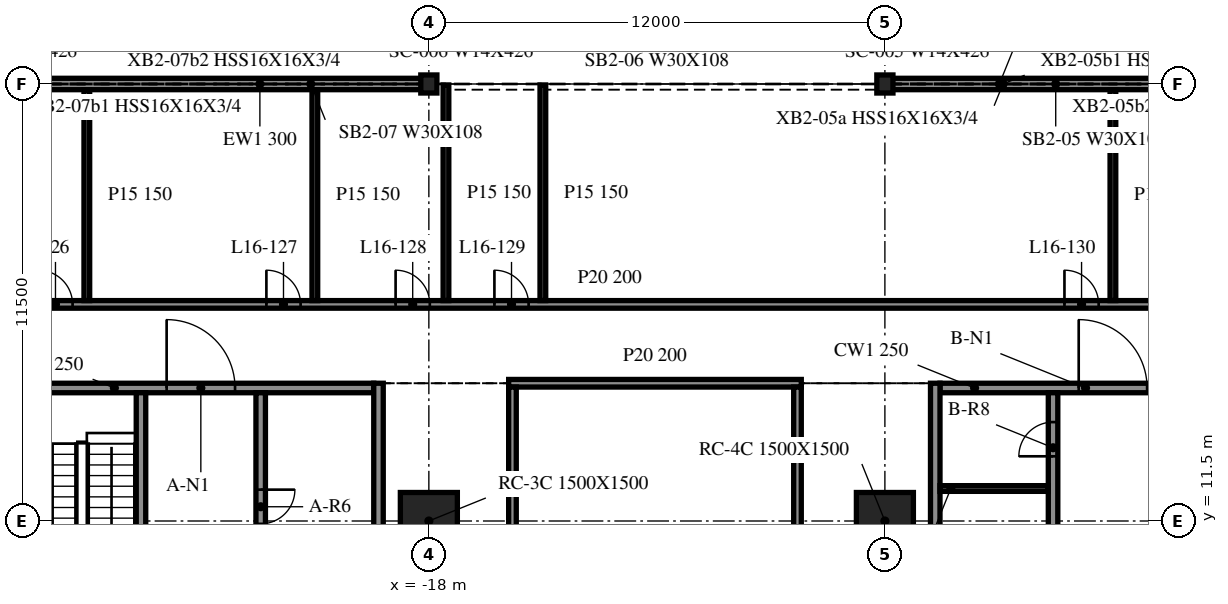
"""IFC4 building model, lengths in metres.
Left out: names, types, materials, properties, quantities, classifications, styles, units other than length and angle.
Written with IfcOpenShell. Run it as: python <this file> out.ifc"""

import sys

from ifc_helpers import new_model, si_unit, direction, frame, frame_2d, origin, origin_2d, place, context, subcontext, project, spatial, rectangle, i_section, extrude, element, fill, save


model = new_model("IFC4")
c1 = context("Model", 3, precision=1e-05, world=origin(), true_north=direction((0.0, 1.0)))
c2 = subcontext(c1, "Body", "Model", "MODEL_VIEW")
j1 = project(units=[si_unit("LENGTHUNIT", "METRE"), si_unit("PLANEANGLEUNIT", "RADIAN")], contexts=[c1])
p1 = place(None, origin())
s1 = spatial("IfcSite", under=j1, at=p1, CompositionType="ELEMENT")
p2 = place(p1, origin())
s2 = spatial("IfcBuilding", under=s1, at=p2, CompositionType="ELEMENT")
p3 = place(p2, frame((0.0, 0.0, 71.8)))
s3 = spatial("IfcBuildingStorey", under=s2, at=p3, CompositionType="ELEMENT", Elevation=71.8)
for number, where, z_axis, x_axis in (
    (1, (-18.0, 11.5, -0.34), (0.0, 0.0, 1.0), (1.0, 0.0, 0.0)),
    (2, (-6.0, 11.5, -0.34), (0.0, 0.0, 1.0), (1.0, 0.0, 0.0)),
):
    element("IfcColumn", number, at=place(p3, frame(where, z_axis=z_axis, x_axis=x_axis)), inside=s3, PredefinedType="COLUMN", context=c2, shape_type="SweptSolid", body=[
        extrude(rectangle(XDim=1.5, YDim=1.5, at=origin_2d()), origin(), (0.0, 0.0, 1.0), 4.3),
    ])
for number, where, z_axis, x_axis in (
    (3, (-6.0, 23.0, -0.34), (0.0, 0.0, 1.0), (1.0, 0.0, 0.0)),
    (4, (-18.0, 23.0, -0.34), (0.0, 0.0, 1.0), (1.0, 0.0, 0.0)),
):
    element("IfcColumn", number, at=place(p3, frame(where, z_axis=z_axis, x_axis=x_axis)), inside=s3, PredefinedType="COLUMN", context=c2, shape_type="SweptSolid", body=[
        extrude(i_section(OverallWidth=0.424, OverallDepth=0.475, WebThickness=0.048, FlangeThickness=0.077, at=origin_2d()), origin(), (0.0, 0.0, 1.0), 4.3),
    ])
for number, where, z_axis, x_axis in (
    (5, (5.976, 23.0, 0.0), (0.0, 0.0, 1.0), (-1.0, 0.0, 0.0)),
    (6, (-18.024, 23.0, 0.0), (0.0, 0.0, 1.0), (-1.0, 0.0, 0.0)),
):
    element("IfcWall", number, at=place(p3, frame(where, z_axis=z_axis, x_axis=x_axis)), inside=s3, PredefinedType="NOTDEFINED", context=c2, shape_type="SweptSolid", body=[
        extrude(rectangle(XDim=11.952, YDim=0.3, at=frame_2d((5.976, 0.0))), origin(), (0.0, 0.0, 1.0), 3.203),
    ])
p4 = place(p3, frame((-19.325, -9.125, 0.0), z_axis=(0.0, 0.0, 1.0), x_axis=(0.0, 1.0, 0.0)))
e7 = element("IfcWall", 7, at=p4, inside=s3, PredefinedType="SOLIDWALL", context=c2, shape_type="SweptSolid", body=[
    extrude(rectangle(XDim=24.25, YDim=0.25, at=frame_2d((12.125, 0.0))), origin(), (0.0, 0.0, 1.0), 3.96),
])
p5 = place(p3, frame((-28.55, 15.0, 0.0), z_axis=(0.0, 0.0, 1.0), x_axis=(1.0, 0.0, 0.0)))
e8 = element("IfcWall", 8, at=p5, inside=s3, PredefinedType="SOLIDWALL", context=c2, shape_type="SweptSolid", body=[
    extrude(rectangle(XDim=9.1, YDim=0.25, at=frame_2d((4.55, 0.0))), origin(), (0.0, 0.0, 1.0), 3.96),
])
p6 = place(p5, frame((3.65, 0.0, 0.0)))
e9 = element("IfcOpeningElement", 9, at=p6, cuts=e8, PredefinedType="OPENING", context=c2, shape_type="SweptSolid", body=[
    extrude(rectangle(XDim=1.8, YDim=2.1, at=frame_2d((0.9, 1.05))), frame((0.0, 0.135, 0.0), z_axis=(0.0, -1.0, 0.0), x_axis=(1.0, 0.0, 0.0)), (0.0, 0.0, 1.0), 0.27),
])
p7 = place(p3, frame((-25.575, 14.875, 0.0), z_axis=(0.0, 0.0, 1.0), x_axis=(0.0, -1.0, 0.0)))
e10 = element("IfcWall", 10, at=p7, inside=s3, PredefinedType="SOLIDWALL", context=c2, shape_type="SweptSolid", body=[
    extrude(rectangle(XDim=6.25, YDim=0.25, at=frame_2d((3.125, 0.0))), origin(), (0.0, 0.0, 1.0), 3.96),
])
p8 = place(p7, frame((4.85, 0.0, 0.0)))
e11 = element("IfcOpeningElement", 11, at=p8, cuts=e10, PredefinedType="OPENING", context=c2, shape_type="SweptSolid", body=[
    extrude(rectangle(XDim=1.0, YDim=2.1, at=frame_2d((0.5, 1.05))), frame((0.0, 0.135, 0.0), z_axis=(0.0, -1.0, 0.0), x_axis=(1.0, 0.0, 0.0)), (0.0, 0.0, 1.0), 0.27),
])
p9 = place(p3, frame((-22.425, 14.875, 0.0), z_axis=(0.0, 0.0, 1.0), x_axis=(0.0, -1.0, 0.0)))
e12 = element("IfcWall", 12, at=p9, inside=s3, PredefinedType="SOLIDWALL", context=c2, shape_type="SweptSolid", body=[
    extrude(rectangle(XDim=23.75, YDim=0.25, at=frame_2d((11.875, 0.0))), origin(), (0.0, 0.0, 1.0), 3.96),
])
p10 = place(p9, frame((15.45, 0.0, 0.0)))
e13 = element("IfcOpeningElement", 13, at=p10, cuts=e12, PredefinedType="OPENING", context=c2, shape_type="SweptSolid", body=[
    extrude(rectangle(XDim=1.1, YDim=2.1, at=frame_2d((0.55, 1.05))), frame((0.0, 0.135, 0.0), z_axis=(0.0, -1.0, 0.0), x_axis=(1.0, 0.0, 0.0)), (0.0, 0.0, 1.0), 0.27),
])
p11 = place(p9, frame((12.7, 0.0, 0.0)))
e14 = element("IfcOpeningElement", 14, at=p11, cuts=e12, PredefinedType="OPENING", context=c2, shape_type="SweptSolid", body=[
    extrude(rectangle(XDim=1.1, YDim=2.1, at=frame_2d((0.55, 1.05))), frame((0.0, 0.135, 0.0), z_axis=(0.0, -1.0, 0.0), x_axis=(1.0, 0.0, 0.0)), (0.0, 0.0, 1.0), 0.27),
])
p12 = place(p9, frame((22.137, 0.0, 0.0)))
e15 = element("IfcOpeningElement", 15, at=p12, cuts=e12, PredefinedType="OPENING", context=c2, shape_type="SweptSolid", body=[
    extrude(rectangle(XDim=0.9, YDim=2.1, at=frame_2d((0.45, 1.05))), frame((0.0, 0.135, 0.0), z_axis=(0.0, -1.0, 0.0), x_axis=(1.0, 0.0, 0.0)), (0.0, 0.0, 1.0), 0.27),
])
p13 = place(p9, frame((19.062, 0.0, 0.0)))
e16 = element("IfcOpeningElement", 16, at=p13, cuts=e12, PredefinedType="OPENING", context=c2, shape_type="SweptSolid", body=[
    extrude(rectangle(XDim=0.9, YDim=2.1, at=frame_2d((0.45, 1.05))), frame((0.0, 0.135, 0.0), z_axis=(0.0, -1.0, 0.0), x_axis=(1.0, 0.0, 0.0)), (0.0, 0.0, 1.0), 0.27),
])
p14 = place(p9, frame((2.55, 0.0, 0.0)))
e17 = element("IfcOpeningElement", 17, at=p14, cuts=e12, PredefinedType="OPENING", context=c2, shape_type="SweptSolid", body=[
    extrude(rectangle(XDim=0.9, YDim=2.1, at=frame_2d((0.45, 1.05))), frame((0.0, 0.135, 0.0), z_axis=(0.0, -1.0, 0.0), x_axis=(1.0, 0.0, 0.0)), (0.0, 0.0, 1.0), 0.27),
])
p15 = place(p3, frame((-4.675, 15.125, 0.0), z_axis=(0.0, 0.0, 1.0), x_axis=(0.0, -1.0, 0.0)))
e18 = element("IfcWall", 18, at=p15, inside=s3, PredefinedType="SOLIDWALL", context=c2, shape_type="SweptSolid", body=[
    extrude(rectangle(XDim=24.25, YDim=0.25, at=frame_2d((12.125, 0.0))), origin(), (0.0, 0.0, 1.0), 3.96),
])
p16 = place(p3, frame((-4.55, 15.0, 0.0), z_axis=(0.0, 0.0, 1.0), x_axis=(1.0, 0.0, 0.0)))
e19 = element("IfcWall", 19, at=p16, inside=s3, PredefinedType="SOLIDWALL", context=c2, shape_type="SweptSolid", body=[
    extrude(rectangle(XDim=9.1, YDim=0.25, at=frame_2d((4.55, 0.0))), origin(), (0.0, 0.0, 1.0), 3.96),
])
p17 = place(p16, frame((3.65, 0.0, 0.0)))
e20 = element("IfcOpeningElement", 20, at=p17, cuts=e19, PredefinedType="OPENING", context=c2, shape_type="SweptSolid", body=[
    extrude(rectangle(XDim=1.8, YDim=2.1, at=frame_2d((0.9, 1.05))), frame((0.0, 0.135, 0.0), z_axis=(0.0, -1.0, 0.0), x_axis=(1.0, 0.0, 0.0)), (0.0, 0.0, 1.0), 0.27),
])
p18 = place(p3, frame((-1.575, -8.875, 0.0), z_axis=(0.0, 0.0, 1.0), x_axis=(0.0, 1.0, 0.0)))
e21 = element("IfcWall", 21, at=p18, inside=s3, PredefinedType="SOLIDWALL", context=c2, shape_type="SweptSolid", body=[
    extrude(rectangle(XDim=23.75, YDim=0.25, at=frame_2d((11.875, 0.0))), origin(), (0.0, 0.0, 1.0), 3.96),
])
p19 = place(p18, frame((7.625, 0.0, 0.0)))
e22 = element("IfcOpeningElement", 22, at=p19, cuts=e21, PredefinedType="OPENING", context=c2, shape_type="SweptSolid", body=[
    extrude(rectangle(XDim=0.9, YDim=2.1, at=frame_2d((0.45, 1.05))), frame((0.0, 0.135, 0.0), z_axis=(0.0, -1.0, 0.0), x_axis=(1.0, 0.0, 0.0)), (0.0, 0.0, 1.0), 0.27),
])
p20 = place(p18, frame((11.425, 0.0, 0.0)))
e23 = element("IfcOpeningElement", 23, at=p20, cuts=e21, PredefinedType="OPENING", context=c2, shape_type="SweptSolid", body=[
    extrude(rectangle(XDim=0.9, YDim=2.1, at=frame_2d((0.45, 1.05))), frame((0.0, 0.135, 0.0), z_axis=(0.0, -1.0, 0.0), x_axis=(1.0, 0.0, 0.0)), (0.0, 0.0, 1.0), 0.27),
])
p21 = place(p18, frame((15.225, 0.0, 0.0)))
e24 = element("IfcOpeningElement", 24, at=p21, cuts=e21, PredefinedType="OPENING", context=c2, shape_type="SweptSolid", body=[
    extrude(rectangle(XDim=0.9, YDim=2.1, at=frame_2d((0.45, 1.05))), frame((0.0, 0.135, 0.0), z_axis=(0.0, -1.0, 0.0), x_axis=(1.0, 0.0, 0.0)), (0.0, 0.0, 1.0), 0.27),
])
p22 = place(p18, frame((2.55, 0.0, 0.0)))
e25 = element("IfcOpeningElement", 25, at=p22, cuts=e21, PredefinedType="OPENING", context=c2, shape_type="SweptSolid", body=[
    extrude(rectangle(XDim=0.9, YDim=2.1, at=frame_2d((0.45, 1.05))), frame((0.0, 0.135, 0.0), z_axis=(0.0, -1.0, 0.0), x_axis=(1.0, 0.0, 0.0)), (0.0, 0.0, 1.0), 0.27),
])
p23 = place(p18, frame((19.002, 0.0, 0.0)))
e26 = element("IfcOpeningElement", 26, at=p23, cuts=e21, PredefinedType="OPENING", context=c2, shape_type="SweptSolid", body=[
    extrude(rectangle(XDim=0.9, YDim=2.1, at=frame_2d((0.45, 1.05))), frame((0.0, 0.135, 0.0), z_axis=(0.0, -1.0, 0.0), x_axis=(1.0, 0.0, 0.0)), (0.0, 0.0, 1.0), 0.27),
])
p24 = place(p18, frame((22.077, 0.0, 0.0)))
e27 = element("IfcOpeningElement", 27, at=p24, cuts=e21, PredefinedType="OPENING", context=c2, shape_type="SweptSolid", body=[
    extrude(rectangle(XDim=0.9, YDim=2.1, at=frame_2d((0.45, 1.05))), frame((0.0, 0.135, 0.0), z_axis=(0.0, -1.0, 0.0), x_axis=(1.0, 0.0, 0.0)), (0.0, 0.0, 1.0), 0.27),
])
p25 = place(p3, frame((-4.55, 12.355, 0.0), z_axis=(0.0, 0.0, 1.0), x_axis=(1.0, 0.0, 0.0)))
e28 = element("IfcWall", 28, at=p25, inside=s3, PredefinedType="PARTITIONING", context=c2, shape_type="SweptSolid", body=[
    extrude(rectangle(XDim=2.85, YDim=0.15, at=frame_2d((1.425, 0.0))), origin(), (0.0, 0.0, 1.0), 3.96),
])
p26 = place(p3, frame((-15.9, 15.125, 0.0), z_axis=(0.0, 0.0, 1.0), x_axis=(1.0, 0.0, 0.0)))
e29 = element("IfcWall", 29, at=p26, inside=s3, PredefinedType="PARTITIONING", context=c2, shape_type="SweptSolid", body=[
    extrude(rectangle(XDim=7.7, YDim=0.2, at=frame_2d((3.85, 0.0))), origin(), (0.0, 0.0, 1.0), 3.96),
])
p27 = place(p3, frame((-41.975, 17.2, 0.0), z_axis=(0.0, 0.0, 1.0), x_axis=(1.0, 0.0, 0.0)))
e30 = element("IfcWall", 30, at=p27, inside=s3, PredefinedType="PARTITIONING", context=c2, shape_type="SweptSolid", body=[
    extrude(rectangle(XDim=95.782, YDim=0.2, at=frame_2d((47.891, 0.0))), origin(), (0.0, 0.0, 1.0), 3.96),
])
p28 = place(p27, frame((13.7, 0.0, 0.0)))
e31 = element("IfcOpeningElement", 31, at=p28, cuts=e30, PredefinedType="OPENING", context=c2, shape_type="SweptSolid", body=[
    extrude(rectangle(XDim=0.9, YDim=2.1, at=frame_2d((0.45, 1.05))), frame((0.0, 0.11, 0.0), z_axis=(0.0, -1.0, 0.0), x_axis=(1.0, 0.0, 0.0)), (0.0, 0.0, 1.0), 0.22),
])
p29 = place(p27, frame((19.7, 0.0, 0.0)))
e32 = element("IfcOpeningElement", 32, at=p29, cuts=e30, PredefinedType="OPENING", context=c2, shape_type="SweptSolid", body=[
    extrude(rectangle(XDim=0.9, YDim=2.1, at=frame_2d((0.45, 1.05))), frame((0.0, 0.11, 0.0), z_axis=(0.0, -1.0, 0.0), x_axis=(1.0, 0.0, 0.0)), (0.0, 0.0, 1.0), 0.22),
])
p30 = place(p27, frame((23.1, 0.0, 0.0)))
e33 = element("IfcOpeningElement", 33, at=p30, cuts=e30, PredefinedType="OPENING", context=c2, shape_type="SweptSolid", body=[
    extrude(rectangle(XDim=0.9, YDim=2.1, at=frame_2d((0.45, 1.05))), frame((0.0, 0.11, 0.0), z_axis=(0.0, -1.0, 0.0), x_axis=(1.0, 0.0, 0.0)), (0.0, 0.0, 1.0), 0.22),
])
p31 = place(p27, frame((25.7, 0.0, 0.0)))
e34 = element("IfcOpeningElement", 34, at=p31, cuts=e30, PredefinedType="OPENING", context=c2, shape_type="SweptSolid", body=[
    extrude(rectangle(XDim=0.9, YDim=2.1, at=frame_2d((0.45, 1.05))), frame((0.0, 0.11, 0.0), z_axis=(0.0, -1.0, 0.0), x_axis=(1.0, 0.0, 0.0)), (0.0, 0.0, 1.0), 0.22),
])
p32 = place(p27, frame((40.7, 0.0, 0.0)))
e35 = element("IfcOpeningElement", 35, at=p32, cuts=e30, PredefinedType="OPENING", context=c2, shape_type="SweptSolid", body=[
    extrude(rectangle(XDim=0.9, YDim=2.1, at=frame_2d((0.45, 1.05))), frame((0.0, 0.11, 0.0), z_axis=(0.0, -1.0, 0.0), x_axis=(1.0, 0.0, 0.0)), (0.0, 0.0, 1.0), 0.22),
])
p33 = place(p27, frame((46.7, 0.0, 0.0)))
e36 = element("IfcOpeningElement", 36, at=p33, cuts=e30, PredefinedType="OPENING", context=c2, shape_type="SweptSolid", body=[
    extrude(rectangle(XDim=0.9, YDim=2.1, at=frame_2d((0.45, 1.05))), frame((0.0, 0.11, 0.0), z_axis=(0.0, -1.0, 0.0), x_axis=(1.0, 0.0, 0.0)), (0.0, 0.0, 1.0), 0.22),
])
p34 = place(p27, frame((48.1, 0.0, 0.0)))
e37 = element("IfcOpeningElement", 37, at=p34, cuts=e30, PredefinedType="OPENING", context=c2, shape_type="SweptSolid", body=[
    extrude(rectangle(XDim=0.9, YDim=2.1, at=frame_2d((0.45, 1.05))), frame((0.0, 0.11, 0.0), z_axis=(0.0, -1.0, 0.0), x_axis=(1.0, 0.0, 0.0)), (0.0, 0.0, 1.0), 0.22),
])
p35 = place(p27, frame((51.5, 0.0, 0.0)))
e38 = element("IfcOpeningElement", 38, at=p35, cuts=e30, PredefinedType="OPENING", context=c2, shape_type="SweptSolid", body=[
    extrude(rectangle(XDim=0.9, YDim=2.1, at=frame_2d((0.45, 1.05))), frame((0.0, 0.11, 0.0), z_axis=(0.0, -1.0, 0.0), x_axis=(1.0, 0.0, 0.0)), (0.0, 0.0, 1.0), 0.22),
])
p36 = place(p27, frame((54.1, 0.0, 0.0)))
e39 = element("IfcOpeningElement", 39, at=p36, cuts=e30, PredefinedType="OPENING", context=c2, shape_type="SweptSolid", body=[
    extrude(rectangle(XDim=0.9, YDim=2.1, at=frame_2d((0.45, 1.05))), frame((0.0, 0.11, 0.0), z_axis=(0.0, -1.0, 0.0), x_axis=(1.0, 0.0, 0.0)), (0.0, 0.0, 1.0), 0.22),
])
p37 = place(p27, frame((69.1, 0.0, 0.0)))
e40 = element("IfcOpeningElement", 40, at=p37, cuts=e30, PredefinedType="OPENING", context=c2, shape_type="SweptSolid", body=[
    extrude(rectangle(XDim=0.9, YDim=2.1, at=frame_2d((0.45, 1.05))), frame((0.0, 0.11, 0.0), z_axis=(0.0, -1.0, 0.0), x_axis=(1.0, 0.0, 0.0)), (0.0, 0.0, 1.0), 0.22),
])
p38 = place(p27, frame((75.1, 0.0, 0.0)))
e41 = element("IfcOpeningElement", 41, at=p38, cuts=e30, PredefinedType="OPENING", context=c2, shape_type="SweptSolid", body=[
    extrude(rectangle(XDim=0.9, YDim=2.1, at=frame_2d((0.45, 1.05))), frame((0.0, 0.11, 0.0), z_axis=(0.0, -1.0, 0.0), x_axis=(1.0, 0.0, 0.0)), (0.0, 0.0, 1.0), 0.22),
])
p39 = place(p27, frame((78.1, 0.0, 0.0)))
e42 = element("IfcOpeningElement", 42, at=p39, cuts=e30, PredefinedType="OPENING", context=c2, shape_type="SweptSolid", body=[
    extrude(rectangle(XDim=0.9, YDim=2.1, at=frame_2d((0.45, 1.05))), frame((0.0, 0.11, 0.0), z_axis=(0.0, -1.0, 0.0), x_axis=(1.0, 0.0, 0.0)), (0.0, 0.0, 1.0), 0.22),
])
p40 = place(p27, frame((81.5, 0.0, 0.0)))
e43 = element("IfcOpeningElement", 43, at=p40, cuts=e30, PredefinedType="OPENING", context=c2, shape_type="SweptSolid", body=[
    extrude(rectangle(XDim=0.9, YDim=2.1, at=frame_2d((0.45, 1.05))), frame((0.0, 0.11, 0.0), z_axis=(0.0, -1.0, 0.0), x_axis=(1.0, 0.0, 0.0)), (0.0, 0.0, 1.0), 0.22),
])
for number, where, z_axis, x_axis in (
    (44, (-27.0, 17.3, 0.0), (0.0, 0.0, 1.0), (0.0, 1.0, 0.0)),
    (45, (-21.0, 17.3, 0.0), (0.0, 0.0, 1.0), (0.0, 1.0, 0.0)),
):
    element("IfcWall", number, at=place(p3, frame(where, z_axis=z_axis, x_axis=x_axis)), inside=s3, PredefinedType="PARTITIONING", context=c2, shape_type="SweptSolid", body=[
        extrude(rectangle(XDim=5.55, YDim=0.15, at=frame_2d((2.775, 0.0))), origin(), (0.0, 0.0, 1.0), 3.96),
    ])
p41 = place(p3, frame((-17.55, 17.3, 0.0), z_axis=(0.0, 0.0, 1.0), x_axis=(0.0, 1.0, 0.0)))
e46 = element("IfcWall", 46, at=p41, inside=s3, PredefinedType="PARTITIONING", context=c2, shape_type="SweptSolid", body=[
    extrude(rectangle(XDim=5.675, YDim=0.15, at=frame_2d((2.837, 0.0))), origin(), (0.0, 0.0, 1.0), 3.96),
])
p42 = place(p3, frame((-15.8, -9.025, 0.0), z_axis=(0.0, 0.0, 1.0), x_axis=(0.0, 1.0, 0.0)))
e47 = element("IfcWall", 47, at=p42, inside=s3, PredefinedType="PARTITIONING", context=c2, shape_type="SweptSolid", body=[
    extrude(rectangle(XDim=24.05, YDim=0.2, at=frame_2d((12.025, 0.0))), origin(), (0.0, 0.0, 1.0), 3.96),
])
p43 = place(p42, frame((11.5, 0.0, 0.0)))
e48 = element("IfcOpeningElement", 48, at=p43, cuts=e47, PredefinedType="OPENING", context=c2, shape_type="SweptSolid", body=[
    extrude(rectangle(XDim=1.0, YDim=2.1, at=frame_2d((0.5, 1.05))), frame((0.0, 0.11, 0.0), z_axis=(0.0, -1.0, 0.0), x_axis=(1.0, 0.0, 0.0)), (0.0, 0.0, 1.0), 0.22),
])
p44 = place(p3, frame((-15.0, 17.3, 0.0), z_axis=(0.0, 0.0, 1.0), x_axis=(0.0, 1.0, 0.0)))
e49 = element("IfcWall", 49, at=p44, inside=s3, PredefinedType="PARTITIONING", context=c2, shape_type="SweptSolid", body=[
    extrude(rectangle(XDim=5.675, YDim=0.15, at=frame_2d((2.837, 0.0))), origin(), (0.0, 0.0, 1.0), 3.96),
])
p45 = place(p3, frame((-8.3, -9.025, 0.0), z_axis=(0.0, 0.0, 1.0), x_axis=(0.0, 1.0, 0.0)))
e50 = element("IfcWall", 50, at=p45, inside=s3, PredefinedType="PARTITIONING", context=c2, shape_type="SweptSolid", body=[
    extrude(rectangle(XDim=24.05, YDim=0.2, at=frame_2d((12.025, 0.0))), origin(), (0.0, 0.0, 1.0), 3.96),
])
p46 = place(p3, frame((0.0, 17.3, 0.0), z_axis=(0.0, 0.0, 1.0), x_axis=(0.0, 1.0, 0.0)))
e51 = element("IfcWall", 51, at=p46, inside=s3, PredefinedType="PARTITIONING", context=c2, shape_type="SweptSolid", body=[
    extrude(rectangle(XDim=5.55, YDim=0.15, at=frame_2d((2.775, 0.0))), origin(), (0.0, 0.0, 1.0), 3.96),
])
p47 = place(p6, origin())
e52 = element("IfcDoor", 52, at=p47, inside=s3, OperationType="DOUBLE_DOOR_SINGLE_SWING", PredefinedType="DOOR", context=c2, shape_type="SweptSolid", body=[
    extrude(rectangle(XDim=1.8, YDim=2.1, at=frame_2d((0.9, 1.05))), frame((0.0, 0.025, 0.0), z_axis=(0.0, -1.0, 0.0), x_axis=(1.0, 0.0, 0.0)), (0.0, 0.0, 1.0), 0.05),
])
fill(e9, e52)
p48 = place(p14, origin())
e53 = element("IfcDoor", 53, at=p48, inside=s3, OperationType="SINGLE_SWING_RIGHT", PredefinedType="DOOR", context=c2, shape_type="SweptSolid", body=[
    extrude(rectangle(XDim=0.9, YDim=2.1, at=frame_2d((0.45, 1.05))), frame((0.0, 0.025, 0.0), z_axis=(0.0, -1.0, 0.0), x_axis=(1.0, 0.0, 0.0)), (0.0, 0.0, 1.0), 0.05),
])
fill(e17, e53)
p49 = place(p17, origin())
e54 = element("IfcDoor", 54, at=p49, inside=s3, OperationType="DOUBLE_DOOR_SINGLE_SWING", PredefinedType="DOOR", context=c2, shape_type="SweptSolid", body=[
    extrude(rectangle(XDim=1.8, YDim=2.1, at=frame_2d((0.9, 1.05))), frame((0.0, 0.025, 0.0), z_axis=(0.0, -1.0, 0.0), x_axis=(1.0, 0.0, 0.0)), (0.0, 0.0, 1.0), 0.05),
])
fill(e20, e54)
p50 = place(p24, origin())
e55 = element("IfcDoor", 55, at=p50, inside=s3, OperationType="SINGLE_SWING_RIGHT", PredefinedType="DOOR", context=c2, shape_type="SweptSolid", body=[
    extrude(rectangle(XDim=0.9, YDim=2.1, at=frame_2d((0.45, 1.05))), frame((0.0, 0.025, 0.0), z_axis=(0.0, -1.0, 0.0), x_axis=(1.0, 0.0, 0.0)), (0.0, 0.0, 1.0), 0.05),
])
fill(e27, e55)
p51 = place(p28, origin())
e56 = element("IfcDoor", 56, at=p51, inside=s3, OperationType="SINGLE_SWING_LEFT", PredefinedType="DOOR", context=c2, shape_type="SweptSolid", body=[
    extrude(rectangle(XDim=0.9, YDim=2.1, at=frame_2d((0.45, 1.05))), frame((0.0, 0.025, 0.0), z_axis=(0.0, -1.0, 0.0), x_axis=(1.0, 0.0, 0.0)), (0.0, 0.0, 1.0), 0.05),
])
fill(e31, e56)
p52 = place(p29, origin())
e57 = element("IfcDoor", 57, at=p52, inside=s3, OperationType="SINGLE_SWING_LEFT", PredefinedType="DOOR", context=c2, shape_type="SweptSolid", body=[
    extrude(rectangle(XDim=0.9, YDim=2.1, at=frame_2d((0.45, 1.05))), frame((0.0, 0.025, 0.0), z_axis=(0.0, -1.0, 0.0), x_axis=(1.0, 0.0, 0.0)), (0.0, 0.0, 1.0), 0.05),
])
fill(e32, e57)
p53 = place(p30, origin())
e58 = element("IfcDoor", 58, at=p53, inside=s3, OperationType="SINGLE_SWING_LEFT", PredefinedType="DOOR", context=c2, shape_type="SweptSolid", body=[
    extrude(rectangle(XDim=0.9, YDim=2.1, at=frame_2d((0.45, 1.05))), frame((0.0, 0.025, 0.0), z_axis=(0.0, -1.0, 0.0), x_axis=(1.0, 0.0, 0.0)), (0.0, 0.0, 1.0), 0.05),
])
fill(e33, e58)
p54 = place(p31, origin())
e59 = element("IfcDoor", 59, at=p54, inside=s3, OperationType="SINGLE_SWING_LEFT", PredefinedType="DOOR", context=c2, shape_type="SweptSolid", body=[
    extrude(rectangle(XDim=0.9, YDim=2.1, at=frame_2d((0.45, 1.05))), frame((0.0, 0.025, 0.0), z_axis=(0.0, -1.0, 0.0), x_axis=(1.0, 0.0, 0.0)), (0.0, 0.0, 1.0), 0.05),
])
fill(e34, e59)
p55 = place(p32, origin())
e60 = element("IfcDoor", 60, at=p55, inside=s3, OperationType="SINGLE_SWING_LEFT", PredefinedType="DOOR", context=c2, shape_type="SweptSolid", body=[
    extrude(rectangle(XDim=0.9, YDim=2.1, at=frame_2d((0.45, 1.05))), frame((0.0, 0.025, 0.0), z_axis=(0.0, -1.0, 0.0), x_axis=(1.0, 0.0, 0.0)), (0.0, 0.0, 1.0), 0.05),
])
fill(e35, e60)
save(model, sys.argv[1])
